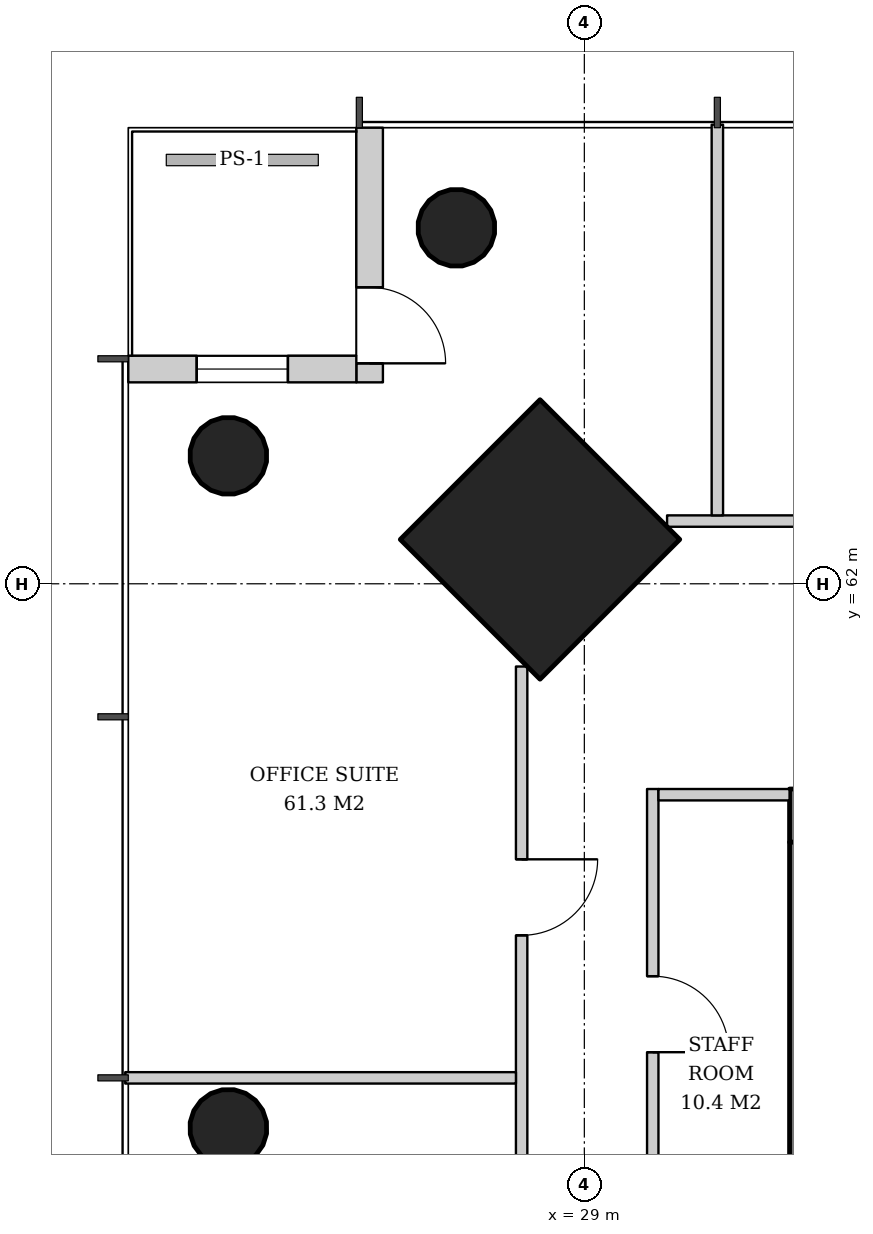
"""IFC4 building model, lengths in metres.
Left out: names, types, materials, properties, quantities, classifications, styles, units other than length and angle.
Written with IfcOpenShell. Run it as: python <this file> out.ifc"""

import sys

from ifc_helpers import new_model, si_unit, direction, frame, frame_2d, origin, origin_2d, place, context, subcontext, project, spatial, rectangle, hollow_circle, extrude, element, fill, save


model = new_model("IFC4")
c1 = context("Model", 3, precision=1e-05, world=origin(), true_north=direction((0.0, 1.0)))
c2 = subcontext(c1, "Body", "Model", "MODEL_VIEW")
j1 = project(units=[si_unit("LENGTHUNIT", "METRE"), si_unit("PLANEANGLEUNIT", "RADIAN")], contexts=[c1])
p1 = place(None, origin())
s1 = spatial("IfcSite", under=j1, at=p1, CompositionType="ELEMENT")
p2 = place(p1, origin())
s2 = spatial("IfcBuilding", under=s1, at=p2, CompositionType="ELEMENT")
p3 = place(p2, frame((0.0, 0.0, 123.6)))
s3 = spatial("IfcBuildingStorey", under=s2, at=p3, CompositionType="ELEMENT", Elevation=123.6)
p4 = place(p3, frame((28.379, 62.621, 0.0), z_axis=(0.031900153262, -0.031900153262, 0.998981861919), x_axis=(0.707106781187, 0.707106781187, 0.0)))
e1 = element("IfcColumn", 1, at=p4, inside=s3, PredefinedType="COLUMN", context=c2, shape_type="SweptSolid", body=[
    extrude(rectangle(XDim=2.6, YDim=2.6, at=origin_2d()), origin(), (0.0, 0.0, 1.0), 3.804),
])
for number, where, z_axis, x_axis in (
    (2, (27.279, 66.721, 0.0), (0.032, -0.032, 0.999), (0.707, 0.707, 0.0)),
    (3, (24.279, 63.721, 0.0), (0.032, -0.032, 0.999), (0.707, 0.707, 0.0)),
):
    element("IfcColumn", number, at=place(p3, frame(where, z_axis=z_axis, x_axis=x_axis)), inside=s3, PredefinedType="COLUMN", context=c2, shape_type="SweptSolid", body=[
        extrude(hollow_circle(Radius=0.508, WallThickness=0.04, at=origin_2d()), origin(), (0.0, 0.0, 1.0), 3.804),
    ])
p5 = place(p3, frame((24.279, 54.861, 0.0), z_axis=(0.031912349901, -0.015924069971, 0.999363810591), x_axis=(0.446493300058, 0.894786976326, 0.0)))
e4 = element("IfcColumn", 4, at=p5, inside=s3, PredefinedType="COLUMN", context=c2, shape_type="SweptSolid", body=[
    extrude(hollow_circle(Radius=0.508, WallThickness=0.04, at=origin_2d()), origin(), (0.0, 0.0, 1.0), 3.802),
])
p6 = place(p3, frame((31.7, 58.95, 0.0), z_axis=(0.0, 0.0, 1.0), x_axis=(1.0, 0.0, 0.0)))
e5 = element("IfcWall", 5, at=p6, inside=s3, PredefinedType="SHEAR", context=c2, shape_type="SweptSolid", body=[
    extrude(rectangle(XDim=26.6, YDim=0.7, at=frame_2d((13.3, 0.0))), origin(), (0.0, 0.0, 1.0), 3.8),
])
p7 = place(p6, frame((17.94, 0.0, 0.0)))
e6 = element("IfcOpeningElement", 6, at=p7, cuts=e5, PredefinedType="OPENING", context=c2, shape_type="SweptSolid", body=[
    extrude(rectangle(XDim=1.0, YDim=2.1, at=frame_2d((0.5, 1.05))), frame((0.0, 0.36, 0.0), z_axis=(0.0, -1.0, 0.0), x_axis=(1.0, 0.0, 0.0)), (0.0, 0.0, 1.0), 0.72),
])
p8 = place(p6, frame((5.825, 0.0, 0.0)))
e7 = element("IfcOpeningElement", 7, at=p8, cuts=e5, PredefinedType="OPENING", context=c2, shape_type="SweptSolid", body=[
    extrude(rectangle(XDim=1.0, YDim=2.1, at=frame_2d((0.5, 1.05))), frame((0.0, 0.36, 0.0), z_axis=(0.0, -1.0, 0.0), x_axis=(1.0, 0.0, 0.0)), (0.0, 0.0, 1.0), 0.72),
])
p9 = place(p6, frame((1.837, 0.0, 0.0)))
e8 = element("IfcOpeningElement", 8, at=p9, cuts=e5, PredefinedType="OPENING", context=c2, shape_type="SweptSolid", body=[
    extrude(rectangle(XDim=1.0, YDim=2.1, at=frame_2d((0.5, 1.05))), frame((0.0, 0.36, 0.0), z_axis=(0.0, -1.0, 0.0), x_axis=(1.0, 0.0, 0.0)), (0.0, 0.0, 1.0), 0.72),
])
p10 = place(p6, frame((3.781, 0.0, 0.0)))
e9 = element("IfcOpeningElement", 9, at=p10, cuts=e5, PredefinedType="OPENING", context=c2, shape_type="SweptSolid", body=[
    extrude(rectangle(XDim=1.0, YDim=2.1, at=frame_2d((0.5, 1.05))), frame((0.0, 0.36, 0.0), z_axis=(0.0, -1.0, 0.0), x_axis=(1.0, 0.0, 0.0)), (0.0, 0.0, 1.0), 0.72),
])
p11 = place(p6, frame((8.342, 0.0, 0.0)))
e10 = element("IfcOpeningElement", 10, at=p11, cuts=e5, PredefinedType="OPENING", context=c2, shape_type="SweptSolid", body=[
    extrude(rectangle(XDim=1.0, YDim=2.1, at=frame_2d((0.5, 1.05))), frame((0.0, 0.36, 0.0), z_axis=(0.0, -1.0, 0.0), x_axis=(1.0, 0.0, 0.0)), (0.0, 0.0, 1.0), 0.72),
])
p12 = place(p6, frame((11.626, 0.0, 0.0)))
e11 = element("IfcOpeningElement", 11, at=p12, cuts=e5, PredefinedType="OPENING", context=c2, shape_type="SweptSolid", body=[
    extrude(rectangle(XDim=1.0, YDim=2.1, at=frame_2d((0.5, 1.05))), frame((0.0, 0.36, 0.0), z_axis=(0.0, -1.0, 0.0), x_axis=(1.0, 0.0, 0.0)), (0.0, 0.0, 1.0), 0.72),
])
p13 = place(p6, frame((14.862, 0.0, 0.0)))
e12 = element("IfcOpeningElement", 12, at=p13, cuts=e5, PredefinedType="OPENING", context=c2, shape_type="SweptSolid", body=[
    extrude(rectangle(XDim=1.0, YDim=2.1, at=frame_2d((0.5, 1.05))), frame((0.0, 0.36, 0.0), z_axis=(0.0, -1.0, 0.0), x_axis=(1.0, 0.0, 0.0)), (0.0, 0.0, 1.0), 0.72),
])
p14 = place(p6, frame((20.9, 0.0, 0.0)))
e13 = element("IfcOpeningElement", 13, at=p14, cuts=e5, PredefinedType="OPENING", context=c2, shape_type="SweptSolid", body=[
    extrude(rectangle(XDim=1.0, YDim=2.1, at=frame_2d((0.5, 1.05))), frame((0.0, 0.36, 0.0), z_axis=(0.0, -1.0, 0.0), x_axis=(1.0, 0.0, 0.0)), (0.0, 0.0, 1.0), 0.72),
])
p15 = place(p6, frame((23.75, 0.0, 0.0)))
e14 = element("IfcOpeningElement", 14, at=p15, cuts=e5, PredefinedType="OPENING", context=c2, shape_type="SweptSolid", body=[
    extrude(rectangle(XDim=1.0, YDim=2.1, at=frame_2d((0.5, 1.05))), frame((0.0, 0.36, 0.0), z_axis=(0.0, -1.0, 0.0), x_axis=(1.0, 0.0, 0.0)), (0.0, 0.0, 1.0), 0.72),
])
p16 = place(p3, frame((32.05, 33.4, 0.0), z_axis=(0.0, 0.0, 1.0), x_axis=(0.0, 1.0, 0.0)))
e15 = element("IfcWall", 15, at=p16, inside=s3, PredefinedType="SHEAR", context=c2, shape_type="SweptSolid", body=[
    extrude(rectangle(XDim=25.2, YDim=0.7, at=frame_2d((12.6, 0.0))), origin(), (0.0, 0.0, 1.0), 3.8),
])
p17 = place(p16, frame((11.7, 0.0, 0.0)))
e16 = element("IfcOpeningElement", 16, at=p17, cuts=e15, PredefinedType="OPENING", context=c2, shape_type="SweptSolid", body=[
    extrude(rectangle(XDim=1.8, YDim=2.4, at=frame_2d((0.9, 1.2))), frame((0.0, 0.36, 0.0), z_axis=(0.0, -1.0, 0.0), x_axis=(1.0, 0.0, 0.0)), (0.0, 0.0, 1.0), 0.72),
])
p18 = place(p16, frame((3.6, 0.0, 0.0)))
e17 = element("IfcOpeningElement", 17, at=p18, cuts=e15, PredefinedType="OPENING", context=c2, shape_type="SweptSolid", body=[
    extrude(rectangle(XDim=1.0, YDim=2.1, at=frame_2d((0.5, 1.05))), frame((0.0, 0.36, 0.0), z_axis=(0.0, -1.0, 0.0), x_axis=(1.0, 0.0, 0.0)), (0.0, 0.0, 1.0), 0.72),
])
p19 = place(p16, frame((6.35, 0.0, 0.0)))
e18 = element("IfcOpeningElement", 18, at=p19, cuts=e15, PredefinedType="OPENING", context=c2, shape_type="SweptSolid", body=[
    extrude(rectangle(XDim=1.0, YDim=2.1, at=frame_2d((0.5, 1.05))), frame((0.0, 0.36, 0.0), z_axis=(0.0, -1.0, 0.0), x_axis=(1.0, 0.0, 0.0)), (0.0, 0.0, 1.0), 0.72),
])
p20 = place(p16, frame((9.1, 0.0, 0.0)))
e19 = element("IfcOpeningElement", 19, at=p20, cuts=e15, PredefinedType="OPENING", context=c2, shape_type="SweptSolid", body=[
    extrude(rectangle(XDim=1.0, YDim=2.1, at=frame_2d((0.5, 1.05))), frame((0.0, 0.36, 0.0), z_axis=(0.0, -1.0, 0.0), x_axis=(1.0, 0.0, 0.0)), (0.0, 0.0, 1.0), 0.72),
])
p21 = place(p16, frame((15.1, 0.0, 0.0)))
e20 = element("IfcOpeningElement", 20, at=p21, cuts=e15, PredefinedType="OPENING", context=c2, shape_type="SweptSolid", body=[
    extrude(rectangle(XDim=1.0, YDim=2.1, at=frame_2d((0.5, 1.05))), frame((0.0, 0.36, 0.0), z_axis=(0.0, -1.0, 0.0), x_axis=(1.0, 0.0, 0.0)), (0.0, 0.0, 1.0), 0.72),
])
p22 = place(p16, frame((17.85, 0.0, 0.0)))
e21 = element("IfcOpeningElement", 21, at=p22, cuts=e15, PredefinedType="OPENING", context=c2, shape_type="SweptSolid", body=[
    extrude(rectangle(XDim=1.0, YDim=2.1, at=frame_2d((0.5, 1.05))), frame((0.0, 0.36, 0.0), z_axis=(0.0, -1.0, 0.0), x_axis=(1.0, 0.0, 0.0)), (0.0, 0.0, 1.0), 0.72),
])
p23 = place(p3, frame((26.175, 68.0, 0.0), z_axis=(0.0, 0.0, 1.0), x_axis=(0.0, -1.0, 0.0)))
e22 = element("IfcWall", 22, at=p23, inside=s3, PredefinedType="SOLIDWALL", context=c2, shape_type="SweptSolid", body=[
    extrude(rectangle(XDim=3.35, YDim=0.35, at=frame_2d((1.675, 0.0))), origin(), (0.0, 0.0, 1.0), 3.62),
])
p24 = place(p23, frame((2.1, 0.0, 0.0)))
e23 = element("IfcOpeningElement", 23, at=p24, cuts=e22, PredefinedType="OPENING", context=c2, shape_type="SweptSolid", body=[
    extrude(rectangle(XDim=1.0, YDim=2.4, at=frame_2d((0.5, 1.2))), frame((0.0, 0.185, 0.0), z_axis=(0.0, -1.0, 0.0), x_axis=(1.0, 0.0, 0.0)), (0.0, 0.0, 1.0), 0.37),
])
p25 = place(p3, frame((26.0, 64.825, 0.0), z_axis=(0.0, 0.0, 1.0), x_axis=(-1.0, 0.0, 0.0)))
e24 = element("IfcWall", 24, at=p25, inside=s3, PredefinedType="SOLIDWALL", context=c2, shape_type="SweptSolid", body=[
    extrude(rectangle(XDim=3.0, YDim=0.35, at=frame_2d((1.5, 0.0))), origin(), (0.0, 0.0, 1.0), 3.62),
])
p26 = place(p25, frame((0.9, 0.0, 0.6)))
e25 = element("IfcOpeningElement", 25, at=p26, cuts=e24, PredefinedType="OPENING", context=c2, shape_type="SweptSolid", body=[
    extrude(rectangle(XDim=1.2, YDim=2.55, at=frame_2d((0.6, 1.275))), frame((0.0, 0.185, 0.0), z_axis=(0.0, -1.0, 0.0), x_axis=(1.0, 0.0, 0.0)), (0.0, 0.0, 1.0), 0.37),
])
p27 = place(p3, frame((29.9, 59.3, 0.0), z_axis=(0.0, 0.0, 1.0), x_axis=(0.0, -1.0, 0.0)))
e26 = element("IfcWall", 26, at=p27, inside=s3, PredefinedType="PARTITIONING", context=c2, shape_type="SweptSolid", body=[
    extrude(rectangle(XDim=5.925, YDim=0.15, at=frame_2d((2.962, 0.0))), origin(), (0.0, 0.0, 1.0), 2.72),
])
p28 = place(p27, frame((2.462, 0.0, 0.0)))
e27 = element("IfcOpeningElement", 27, at=p28, cuts=e26, PredefinedType="OPENING", context=c2, shape_type="SweptSolid", body=[
    extrude(rectangle(XDim=1.0, YDim=2.1, at=frame_2d((0.5, 1.05))), frame((0.0, 0.085, 0.0), z_axis=(0.0, -1.0, 0.0), x_axis=(1.0, 0.0, 0.0)), (0.0, 0.0, 1.0), 0.17),
])
p29 = place(p3, frame((31.7, 59.225, 0.0), z_axis=(0.0, 0.0, 1.0), x_axis=(-1.0, 0.0, 0.0)))
e28 = element("IfcWall", 28, at=p29, inside=s3, PredefinedType="PARTITIONING", context=c2, shape_type="SweptSolid", body=[
    extrude(rectangle(XDim=1.725, YDim=0.15, at=frame_2d((0.862, 0.0))), origin(), (0.0, 0.0, 1.0), 3.62),
])
p30 = place(p3, frame((59.912, 62.825, 0.0), z_axis=(0.0, 0.0, 1.0), x_axis=(-1.0, 0.0, 0.0)))
e29 = element("IfcWall", 29, at=p30, inside=s3, PredefinedType="PARTITIONING", context=c2, shape_type="SweptSolid", body=[
    extrude(rectangle(XDim=29.823, YDim=0.15, at=frame_2d((14.912, 0.0))), origin(), (0.0, 0.0, 1.0), 2.72),
])
p31 = place(p30, frame((2.537, 0.0, 0.0)))
e30 = element("IfcOpeningElement", 30, at=p31, cuts=e29, PredefinedType="OPENING", context=c2, shape_type="SweptSolid", body=[
    extrude(rectangle(XDim=1.0, YDim=2.1, at=frame_2d((0.5, 1.05))), frame((0.0, 0.085, 0.0), z_axis=(0.0, -1.0, 0.0), x_axis=(1.0, 0.0, 0.0)), (0.0, 0.0, 1.0), 0.17),
])
p32 = place(p30, frame((7.287, 0.0, 0.0)))
e31 = element("IfcOpeningElement", 31, at=p32, cuts=e29, PredefinedType="OPENING", context=c2, shape_type="SweptSolid", body=[
    extrude(rectangle(XDim=1.0, YDim=2.1, at=frame_2d((0.5, 1.05))), frame((0.0, 0.085, 0.0), z_axis=(0.0, -1.0, 0.0), x_axis=(1.0, 0.0, 0.0)), (0.0, 0.0, 1.0), 0.17),
])
p33 = place(p30, frame((12.037, 0.0, 0.0)))
e32 = element("IfcOpeningElement", 32, at=p33, cuts=e29, PredefinedType="OPENING", context=c2, shape_type="SweptSolid", body=[
    extrude(rectangle(XDim=1.0, YDim=2.1, at=frame_2d((0.5, 1.05))), frame((0.0, 0.085, 0.0), z_axis=(0.0, -1.0, 0.0), x_axis=(1.0, 0.0, 0.0)), (0.0, 0.0, 1.0), 0.17),
])
p34 = place(p30, frame((21.537, 0.0, 0.0)))
e33 = element("IfcOpeningElement", 33, at=p34, cuts=e29, PredefinedType="OPENING", context=c2, shape_type="SweptSolid", body=[
    extrude(rectangle(XDim=1.0, YDim=2.1, at=frame_2d((0.5, 1.05))), frame((0.0, 0.085, 0.0), z_axis=(0.0, -1.0, 0.0), x_axis=(1.0, 0.0, 0.0)), (0.0, 0.0, 1.0), 0.17),
])
p35 = place(p3, frame((30.75, 62.9, 0.0), z_axis=(0.0, 0.0, 1.0), x_axis=(0.0, 1.0, 0.0)))
e34 = element("IfcWall", 34, at=p35, inside=s3, PredefinedType="PARTITIONING", context=c2, shape_type="SweptSolid", body=[
    extrude(rectangle(XDim=5.14, YDim=0.15, at=frame_2d((2.57, 0.0))), origin(), (0.0, 0.0, 1.0), 2.82),
])
p36 = place(p3, frame((28.175, 60.912, 0.0), z_axis=(0.0, 0.0, 1.0), x_axis=(0.0, -1.0, 0.0)))
e35 = element("IfcWall", 35, at=p36, inside=s3, PredefinedType="PARTITIONING", context=c2, shape_type="SweptSolid", body=[
    extrude(rectangle(XDim=29.823, YDim=0.15, at=frame_2d((14.912, 0.0))), origin(), (0.0, 0.0, 1.0), 2.72),
])
p37 = place(p36, frame((2.537, 0.0, 0.0)))
e36 = element("IfcOpeningElement", 36, at=p37, cuts=e35, PredefinedType="OPENING", context=c2, shape_type="SweptSolid", body=[
    extrude(rectangle(XDim=1.0, YDim=2.1, at=frame_2d((0.5, 1.05))), frame((0.0, 0.085, 0.0), z_axis=(0.0, -1.0, 0.0), x_axis=(1.0, 0.0, 0.0)), (0.0, 0.0, 1.0), 0.17),
])
p38 = place(p36, frame((7.287, 0.0, 0.0)))
e37 = element("IfcOpeningElement", 37, at=p38, cuts=e35, PredefinedType="OPENING", context=c2, shape_type="SweptSolid", body=[
    extrude(rectangle(XDim=1.0, YDim=2.1, at=frame_2d((0.5, 1.05))), frame((0.0, 0.085, 0.0), z_axis=(0.0, -1.0, 0.0), x_axis=(1.0, 0.0, 0.0)), (0.0, 0.0, 1.0), 0.17),
])
p39 = place(p36, frame((12.037, 0.0, 0.0)))
e38 = element("IfcOpeningElement", 38, at=p39, cuts=e35, PredefinedType="OPENING", context=c2, shape_type="SweptSolid", body=[
    extrude(rectangle(XDim=1.0, YDim=2.1, at=frame_2d((0.5, 1.05))), frame((0.0, 0.085, 0.0), z_axis=(0.0, -1.0, 0.0), x_axis=(1.0, 0.0, 0.0)), (0.0, 0.0, 1.0), 0.17),
])
p40 = place(p36, frame((16.886, 0.0, 0.0)))
e39 = element("IfcOpeningElement", 39, at=p40, cuts=e35, PredefinedType="OPENING", context=c2, shape_type="SweptSolid", body=[
    extrude(rectangle(XDim=0.8, YDim=2.1, at=frame_2d((0.4, 1.05))), frame((0.0, 0.085, 0.0), z_axis=(0.0, -1.0, 0.0), x_axis=(1.0, 0.0, 0.0)), (0.0, 0.0, 1.0), 0.17),
])
p41 = place(p36, frame((21.537, 0.0, 0.0)))
e40 = element("IfcOpeningElement", 40, at=p41, cuts=e35, PredefinedType="OPENING", context=c2, shape_type="SweptSolid", body=[
    extrude(rectangle(XDim=1.0, YDim=2.1, at=frame_2d((0.5, 1.05))), frame((0.0, 0.085, 0.0), z_axis=(0.0, -1.0, 0.0), x_axis=(1.0, 0.0, 0.0)), (0.0, 0.0, 1.0), 0.17),
])
p42 = place(p36, frame((26.386, 0.0, 0.0)))
e41 = element("IfcOpeningElement", 41, at=p42, cuts=e35, PredefinedType="OPENING", context=c2, shape_type="SweptSolid", body=[
    extrude(rectangle(XDim=0.8, YDim=2.1, at=frame_2d((0.4, 1.05))), frame((0.0, 0.085, 0.0), z_axis=(0.0, -1.0, 0.0), x_axis=(1.0, 0.0, 0.0)), (0.0, 0.0, 1.0), 0.17),
])
p43 = place(p3, frame((28.1, 55.5, 0.0), z_axis=(0.0, 0.0, 1.0), x_axis=(-1.0, 0.0, 0.0)))
e42 = element("IfcWall", 42, at=p43, inside=s3, PredefinedType="PARTITIONING", context=c2, shape_type="SweptSolid", body=[
    extrude(rectangle(XDim=5.14, YDim=0.15, at=frame_2d((2.57, 0.0))), origin(), (0.0, 0.0, 1.0), 2.82),
])
p44 = place(p24, origin())
e43 = element("IfcDoor", 43, at=p44, inside=s3, OperationType="SINGLE_SWING_RIGHT", PredefinedType="DOOR", context=c2, shape_type="SweptSolid", body=[
    extrude(rectangle(XDim=1.0, YDim=2.4, at=frame_2d((0.5, 1.2))), frame((0.0, 0.025, 0.0), z_axis=(0.0, -1.0, 0.0), x_axis=(1.0, 0.0, 0.0)), (0.0, 0.0, 1.0), 0.05),
])
fill(e23, e43)
p45 = place(p26, origin())
e44 = element("IfcWindow", 44, at=p45, inside=s3, PartitioningType="SINGLE_PANEL", PredefinedType="WINDOW", context=c2, shape_type="SweptSolid", body=[
    extrude(rectangle(XDim=1.2, YDim=2.55, at=frame_2d((0.6, 1.275))), frame((0.0, 0.03, 0.0), z_axis=(0.0, -1.0, 0.0), x_axis=(1.0, 0.0, 0.0)), (0.0, 0.0, 1.0), 0.06),
])
fill(e25, e44)
p46 = place(p28, origin())
e45 = element("IfcDoor", 45, at=p46, inside=s3, OperationType="SINGLE_SWING_RIGHT", PredefinedType="DOOR", context=c2, shape_type="SweptSolid", body=[
    extrude(rectangle(XDim=1.0, YDim=2.1, at=frame_2d((0.5, 1.05))), frame((0.0, 0.025, 0.0), z_axis=(0.0, -1.0, 0.0), x_axis=(1.0, 0.0, 0.0)), (0.0, 0.0, 1.0), 0.05),
])
fill(e27, e45)
p47 = place(p37, origin())
e46 = element("IfcDoor", 46, at=p47, inside=s3, OperationType="SINGLE_SWING_LEFT", PredefinedType="DOOR", context=c2, shape_type="SweptSolid", body=[
    extrude(rectangle(XDim=1.0, YDim=2.1, at=frame_2d((0.5, 1.05))), frame((0.0, 0.025, 0.0), z_axis=(0.0, -1.0, 0.0), x_axis=(1.0, 0.0, 0.0)), (0.0, 0.0, 1.0), 0.05),
])
fill(e36, e46)
save(model, sys.argv[1])
